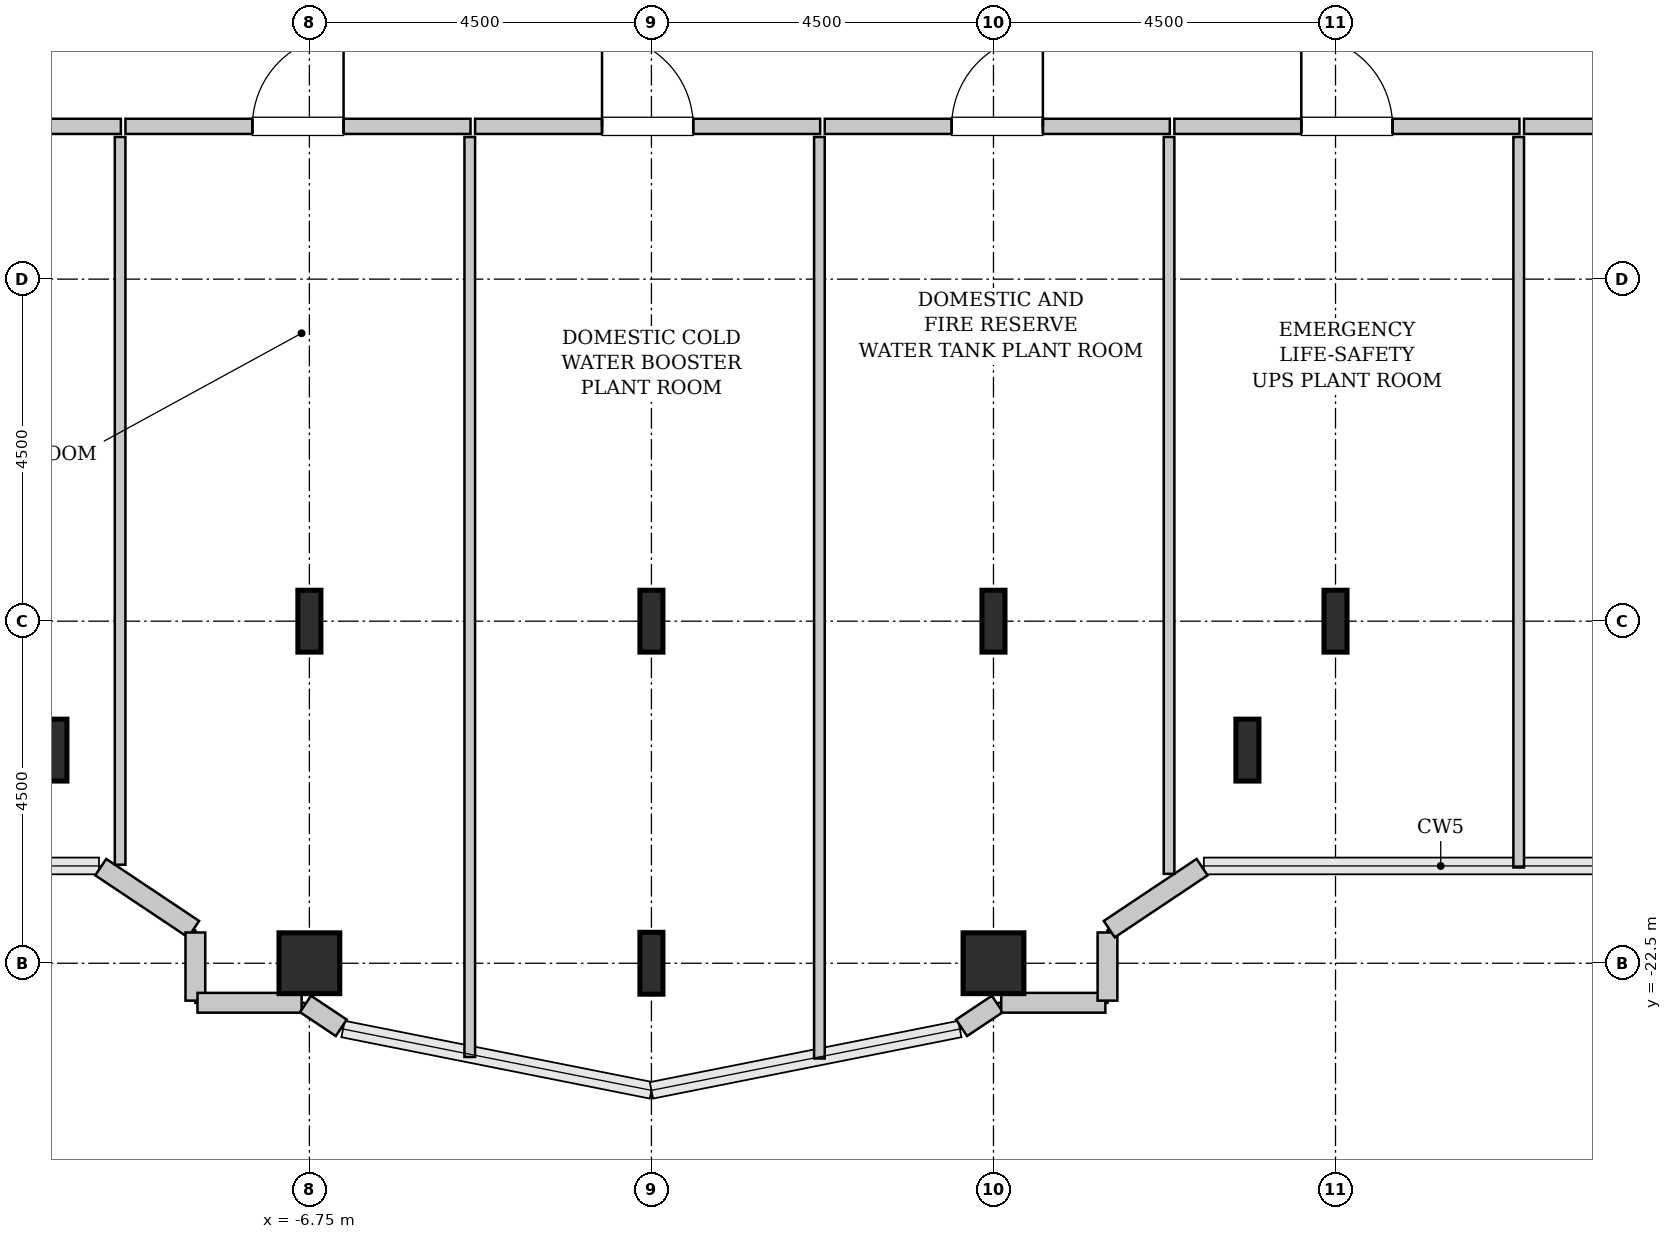
"""IFC4 building model, lengths in metres.
Left out: names, types, materials, properties, quantities, classifications, styles, units other than length and angle.
Written with IfcOpenShell. Run it as: python <this file> out.ifc"""

import sys

from ifc_helpers import new_model, si_unit, direction, frame, frame_2d, origin, origin_2d, place, context, subcontext, project, spatial, rectangle, hollow_rectangle, i_section, extrude, source, transform, mapped, element, fill, save


model = new_model("IFC4")
c1 = context("Model", 3, precision=1e-05, world=origin(), true_north=direction((0.0, 1.0)))
c2 = subcontext(c1, "Body", "Model", "MODEL_VIEW")
j1 = project(units=[si_unit("LENGTHUNIT", "METRE"), si_unit("PLANEANGLEUNIT", "RADIAN")], contexts=[c1])
p1 = place(None, origin())
s1 = spatial("IfcSite", under=j1, at=p1, CompositionType="ELEMENT")
p2 = place(p1, origin())
s2 = spatial("IfcBuilding", under=s1, at=p2, CompositionType="ELEMENT")
p3 = place(p2, frame((0.0, 0.0, 202.0)))
s3 = spatial("IfcBuildingStorey", under=s2, at=p3, CompositionType="ELEMENT", Elevation=202.0)
m1 = source(origin(), c2, "Body", "SweptSolid", [
    extrude(i_section(OverallWidth=0.303, OverallDepth=0.814, WebThickness=0.021, FlangeThickness=0.04, FilletRadius=0.03, at=origin_2d()), origin(), (0.0, 0.0, 1.0), 4.6),
])
p4 = place(p3, frame((-10.091, -19.696, 0.0), z_axis=(0.0, 0.0, 1.0), x_axis=(1.0, 0.0, 0.0)))
e1 = element("IfcColumn", 1, at=p4, inside=s3, PredefinedType="COLUMN", context=c2, shape_type="MappedRepresentation", body=[
    mapped(m1, transform((0.0, 0.0, 0.0), x_axis=(1.0, 0.0, 0.0), y_axis=(0.0, 1.0, 0.0), z_axis=(0.0, 0.0, 1.0), scale=1.0)),
])
m2 = source(origin(), c2, "Body", "SweptSolid", [
    extrude(hollow_rectangle(XDim=0.8, YDim=0.8, WallThickness=0.04, InnerFilletRadius=0.04, OuterFilletRadius=0.08, at=origin_2d()), origin(), (0.0, 0.0, 1.0), 4.6),
])
p5 = place(p3, frame((-6.75, -22.5, 0.0), z_axis=(0.0, 0.0, 1.0), x_axis=(1.0, 0.0, 0.0)))
e2 = element("IfcColumn", 2, at=p5, inside=s3, PredefinedType="COLUMN", context=c2, shape_type="MappedRepresentation", body=[
    mapped(m2, transform((0.0, 0.0, 0.0), x_axis=(1.0, 0.0, 0.0), y_axis=(0.0, 1.0, 0.0), z_axis=(0.0, 0.0, 1.0), scale=1.0)),
])
for number, where, z_axis, x_axis in (
    (3, (-6.75, -18.0, 0.0), (0.0, 0.0, 1.0), (1.0, 0.0, 0.0)),
    (4, (-2.25, -22.5, 0.0), (0.0, 0.0, 1.0), (1.0, 0.0, 0.0)),
    (5, (-2.25, -18.0, 0.0), (0.0, 0.0, 1.0), (1.0, 0.0, 0.0)),
):
    element("IfcColumn", number, at=place(p3, frame(where, z_axis=z_axis, x_axis=x_axis)), inside=s3, PredefinedType="COLUMN", context=c2, shape_type="MappedRepresentation", body=[
        mapped(m1, transform((0.0, 0.0, 0.0), x_axis=(1.0, 0.0, 0.0), y_axis=(0.0, 1.0, 0.0), z_axis=(0.0, 0.0, 1.0), scale=1.0)),
    ])
p6 = place(p3, frame((2.25, -22.5, 0.0), z_axis=(0.0, 0.0, 1.0), x_axis=(1.0, 0.0, 0.0)))
e6 = element("IfcColumn", 6, at=p6, inside=s3, PredefinedType="COLUMN", context=c2, shape_type="MappedRepresentation", body=[
    mapped(m2, transform((0.0, 0.0, 0.0), x_axis=(1.0, 0.0, 0.0), y_axis=(0.0, 1.0, 0.0), z_axis=(0.0, 0.0, 1.0), scale=1.0)),
])
for number, where, z_axis, x_axis in (
    (7, (2.25, -18.0, 0.0), (0.0, 0.0, 1.0), (1.0, 0.0, 0.0)),
    (8, (5.591, -19.696, 0.0), (0.0, 0.0, 1.0), (1.0, 0.0, 0.0)),
    (9, (6.75, -18.0, 0.0), (0.0, 0.0, 1.0), (1.0, 0.0, 0.0)),
):
    element("IfcColumn", number, at=place(p3, frame(where, z_axis=z_axis, x_axis=x_axis)), inside=s3, PredefinedType="COLUMN", context=c2, shape_type="MappedRepresentation", body=[
        mapped(m1, transform((0.0, 0.0, 0.0), x_axis=(1.0, 0.0, 0.0), y_axis=(0.0, 1.0, 0.0), z_axis=(0.0, 0.0, 1.0), scale=1.0)),
    ])
m3 = source(origin(), c2, "Body", "SweptSolid", [
    extrude(rectangle(XDim=1.469, YDim=0.26, at=frame_2d((0.734, 0.0))), origin(), (0.0, 0.0, 1.0), 4.35),
])
p7 = place(p3, frame((-9.495, -21.236, 0.0), z_axis=(0.0, 0.0, 1.0), x_axis=(0.831461760506, -0.555581983884, 0.0)))
e10 = element("IfcWall", 10, at=p7, inside=s3, PredefinedType="SOLIDWALL", context=c2, shape_type="MappedRepresentation", body=[
    mapped(m3, transform((0.0, 0.0, 0.0), x_axis=(1.0, 0.0, 0.0), y_axis=(0.0, 1.0, 0.0), z_axis=(0.0, 0.0, 1.0), scale=1.0)),
])
m4 = source(origin(), c2, "Body", "SweptSolid", [
    extrude(rectangle(XDim=0.897, YDim=0.26, at=frame_2d((0.448, 0.0))), origin(), (0.0, 0.0, 1.0), 4.35),
])
p8 = place(p3, frame((-8.25, -22.095, 0.0), z_axis=(0.0, 0.0, 1.0), x_axis=(0.0, -1.0, 0.0)))
e11 = element("IfcWall", 11, at=p8, inside=s3, PredefinedType="SOLIDWALL", context=c2, shape_type="MappedRepresentation", body=[
    mapped(m4, transform((0.0, 0.0, 0.0), x_axis=(1.0, 0.0, 0.0), y_axis=(0.0, 1.0, 0.0), z_axis=(0.0, 0.0, 1.0), scale=1.0)),
])
m5 = source(origin(), c2, "Body", "SweptSolid", [
    extrude(rectangle(XDim=1.37, YDim=0.26, at=frame_2d((0.685, 0.0))), origin(), (0.0, 0.0, 1.0), 4.35),
])
p9 = place(p3, frame((-8.222, -23.02, 0.0), z_axis=(0.0, 0.0, 1.0), x_axis=(1.0, 0.0, 0.0)))
e12 = element("IfcWall", 12, at=p9, inside=s3, PredefinedType="SOLIDWALL", context=c2, shape_type="MappedRepresentation", body=[
    mapped(m5, transform((0.0, 0.0, 0.0), x_axis=(1.0, 0.0, 0.0), y_axis=(0.0, 1.0, 0.0), z_axis=(0.0, 0.0, 1.0), scale=1.0)),
])
m6 = source(origin(), c2, "Body", "SweptSolid", [
    extrude(rectangle(XDim=0.565, YDim=0.26, at=frame_2d((0.283, 0.0))), origin(), (0.0, 0.0, 1.0), 4.35),
])
for number, where, z_axis, x_axis in (
    (13, (-6.801, -23.036, 0.0), (0.0, 0.0, 1.0), (0.832, -0.555, 0.0)),
    (14, (1.831, -23.35, 0.0), (0.0, 0.0, 1.0), (0.832, 0.555, 0.0)),
):
    element("IfcWall", number, at=place(p3, frame(where, z_axis=z_axis, x_axis=x_axis)), inside=s3, PredefinedType="SOLIDWALL", context=c2, shape_type="MappedRepresentation", body=[
        mapped(m6, transform((0.0, 0.0, 0.0), x_axis=(1.0, 0.0, 0.0), y_axis=(0.0, 1.0, 0.0), z_axis=(0.0, 0.0, 1.0), scale=1.0)),
    ])
p10 = place(p3, frame((2.352, -23.02, 0.0), z_axis=(0.0, 0.0, 1.0), x_axis=(1.0, 0.0, 0.0)))
e15 = element("IfcWall", 15, at=p10, inside=s3, PredefinedType="SOLIDWALL", context=c2, shape_type="MappedRepresentation", body=[
    mapped(m5, transform((0.0, 0.0, 0.0), x_axis=(1.0, 0.0, 0.0), y_axis=(0.0, 1.0, 0.0), z_axis=(0.0, 0.0, 1.0), scale=1.0)),
])
p11 = place(p3, frame((3.75, -22.992, 0.0), z_axis=(0.0, 0.0, 1.0), x_axis=(0.0, 1.0, 0.0)))
e16 = element("IfcWall", 16, at=p11, inside=s3, PredefinedType="SOLIDWALL", context=c2, shape_type="MappedRepresentation", body=[
    mapped(m4, transform((0.0, 0.0, 0.0), x_axis=(1.0, 0.0, 0.0), y_axis=(0.0, 1.0, 0.0), z_axis=(0.0, 0.0, 1.0), scale=1.0)),
])
p12 = place(p3, frame((3.773, -22.052, 0.0), z_axis=(0.0, 0.0, 1.0), x_axis=(0.831461760506, 0.555581983884, 0.0)))
e17 = element("IfcWall", 17, at=p12, inside=s3, PredefinedType="SOLIDWALL", context=c2, shape_type="MappedRepresentation", body=[
    mapped(m3, transform((0.0, 0.0, 0.0), x_axis=(1.0, 0.0, 0.0), y_axis=(0.0, 1.0, 0.0), z_axis=(0.0, 0.0, 1.0), scale=1.0)),
])
m7 = source(origin(), c2, "Body", "SweptSolid", [
    extrude(rectangle(XDim=24.85, YDim=0.2, at=frame_2d((12.425, 0.0))), origin(), (0.0, 0.0, 1.0), 4.335),
])
p13 = place(p3, frame((-34.08, -11.49, 0.0), z_axis=(0.0, 0.0, 1.0), x_axis=(1.0, 0.0, 0.0)))
e18 = element("IfcWall", 18, at=p13, inside=s3, PredefinedType="SOLIDWALL", context=c2, shape_type="MappedRepresentation", body=[
    mapped(m7, transform((0.0, 0.0, 0.0), x_axis=(1.0, 0.0, 0.0), y_axis=(0.0, 1.0, 0.0), z_axis=(0.0, 0.0, 1.0), scale=1.0)),
])
p14 = place(p13, frame((21.786, 0.0, 0.0)))
e19 = element("IfcOpeningElement", 19, at=p14, cuts=e18, PredefinedType="OPENING", context=c2, shape_type="SweptSolid", body=[
    extrude(rectangle(XDim=1.2, YDim=2.15, at=frame_2d((0.6, 1.075))), frame((0.0, 0.11, 0.0), z_axis=(0.0, -1.0, 0.0), x_axis=(1.0, 0.0, 0.0)), (0.0, 0.0, 1.0), 0.22),
])
m8 = source(origin(), c2, "Body", "SweptSolid", [
    extrude(rectangle(XDim=9.574, YDim=0.14, at=frame_2d((4.787, 0.0))), origin(), (0.0, 0.0, 1.0), 4.335),
])
p15 = place(p3, frame((-9.24, -21.204, 0.0), z_axis=(0.0, 0.0, 1.0), x_axis=(0.0, 1.0, 0.0)))
e20 = element("IfcWall", 20, at=p15, inside=s3, PredefinedType="PARTITIONING", context=c2, shape_type="MappedRepresentation", body=[
    mapped(m8, transform((0.0, 0.0, 0.0), x_axis=(1.0, 0.0, 0.0), y_axis=(0.0, 1.0, 0.0), z_axis=(0.0, 0.0, 1.0), scale=1.0)),
])
m9 = source(origin(), c2, "Body", "SweptSolid", [
    extrude(rectangle(XDim=4.54, YDim=0.2, at=frame_2d((2.27, 0.0))), origin(), (0.0, 0.0, 1.0), 4.335),
])
p16 = place(p3, frame((-9.17, -11.49, 0.0), z_axis=(0.0, 0.0, 1.0), x_axis=(1.0, 0.0, 0.0)))
e21 = element("IfcWall", 21, at=p16, inside=s3, PredefinedType="SOLIDWALL", context=c2, shape_type="MappedRepresentation", body=[
    mapped(m9, transform((0.0, 0.0, 0.0), x_axis=(1.0, 0.0, 0.0), y_axis=(0.0, 1.0, 0.0), z_axis=(0.0, 0.0, 1.0), scale=1.0)),
])
p17 = place(p16, frame((1.67, 0.0, 0.0)))
e22 = element("IfcOpeningElement", 22, at=p17, cuts=e21, PredefinedType="OPENING", context=c2, shape_type="SweptSolid", body=[
    extrude(rectangle(XDim=1.2, YDim=2.15, at=frame_2d((0.6, 1.075))), frame((0.0, 0.11, 0.0), z_axis=(0.0, -1.0, 0.0), x_axis=(1.0, 0.0, 0.0)), (0.0, 0.0, 1.0), 0.22),
])
m10 = source(origin(), c2, "Body", "SweptSolid", [
    extrude(rectangle(XDim=12.104, YDim=0.14, at=frame_2d((6.052, 0.0))), origin(), (0.0, 0.0, 1.0), 4.335),
])
p18 = place(p3, frame((-4.64, -23.733, 0.0), z_axis=(0.0, 0.0, 1.0), x_axis=(0.0, 1.0, 0.0)))
e23 = element("IfcWall", 23, at=p18, inside=s3, PredefinedType="PARTITIONING", context=c2, shape_type="MappedRepresentation", body=[
    mapped(m10, transform((0.0, 0.0, 0.0), x_axis=(1.0, 0.0, 0.0), y_axis=(0.0, 1.0, 0.0), z_axis=(0.0, 0.0, 1.0), scale=1.0)),
])
p19 = place(p3, frame((-4.57, -11.49, 0.0), z_axis=(0.0, 0.0, 1.0), x_axis=(1.0, 0.0, 0.0)))
e24 = element("IfcWall", 24, at=p19, inside=s3, PredefinedType="SOLIDWALL", context=c2, shape_type="MappedRepresentation", body=[
    mapped(m9, transform((0.0, 0.0, 0.0), x_axis=(1.0, 0.0, 0.0), y_axis=(0.0, 1.0, 0.0), z_axis=(0.0, 0.0, 1.0), scale=1.0)),
])
p20 = place(p19, frame((1.67, 0.0, 0.0)))
e25 = element("IfcOpeningElement", 25, at=p20, cuts=e24, PredefinedType="OPENING", context=c2, shape_type="SweptSolid", body=[
    extrude(rectangle(XDim=1.2, YDim=2.15, at=frame_2d((0.6, 1.075))), frame((0.0, 0.11, 0.0), z_axis=(0.0, -1.0, 0.0), x_axis=(1.0, 0.0, 0.0)), (0.0, 0.0, 1.0), 0.22),
])
m11 = source(origin(), c2, "Body", "SweptSolid", [
    extrude(rectangle(XDim=12.123, YDim=0.14, at=frame_2d((6.062, 0.0))), origin(), (0.0, 0.0, 1.0), 4.335),
])
p21 = place(p3, frame((-0.04, -23.753, 0.0), z_axis=(0.0, 0.0, 1.0), x_axis=(0.0, 1.0, 0.0)))
e26 = element("IfcWall", 26, at=p21, inside=s3, PredefinedType="PARTITIONING", context=c2, shape_type="MappedRepresentation", body=[
    mapped(m11, transform((0.0, 0.0, 0.0), x_axis=(1.0, 0.0, 0.0), y_axis=(0.0, 1.0, 0.0), z_axis=(0.0, 0.0, 1.0), scale=1.0)),
])
p22 = place(p3, frame((0.03, -11.49, 0.0), z_axis=(0.0, 0.0, 1.0), x_axis=(1.0, 0.0, 0.0)))
e27 = element("IfcWall", 27, at=p22, inside=s3, PredefinedType="SOLIDWALL", context=c2, shape_type="MappedRepresentation", body=[
    mapped(m9, transform((0.0, 0.0, 0.0), x_axis=(1.0, 0.0, 0.0), y_axis=(0.0, 1.0, 0.0), z_axis=(0.0, 0.0, 1.0), scale=1.0)),
])
p23 = place(p22, frame((1.67, 0.0, 0.0)))
e28 = element("IfcOpeningElement", 28, at=p23, cuts=e27, PredefinedType="OPENING", context=c2, shape_type="SweptSolid", body=[
    extrude(rectangle(XDim=1.2, YDim=2.15, at=frame_2d((0.6, 1.075))), frame((0.0, 0.11, 0.0), z_axis=(0.0, -1.0, 0.0), x_axis=(1.0, 0.0, 0.0)), (0.0, 0.0, 1.0), 0.22),
])
m12 = source(origin(), c2, "Body", "SweptSolid", [
    extrude(rectangle(XDim=9.694, YDim=0.14, at=frame_2d((4.847, 0.0))), origin(), (0.0, 0.0, 1.0), 4.335),
])
p24 = place(p3, frame((4.56, -21.324, 0.0), z_axis=(0.0, 0.0, 1.0), x_axis=(0.0, 1.0, 0.0)))
e29 = element("IfcWall", 29, at=p24, inside=s3, PredefinedType="PARTITIONING", context=c2, shape_type="MappedRepresentation", body=[
    mapped(m12, transform((0.0, 0.0, 0.0), x_axis=(1.0, 0.0, 0.0), y_axis=(0.0, 1.0, 0.0), z_axis=(0.0, 0.0, 1.0), scale=1.0)),
])
p25 = place(p3, frame((4.63, -11.49, 0.0), z_axis=(0.0, 0.0, 1.0), x_axis=(1.0, 0.0, 0.0)))
e30 = element("IfcWall", 30, at=p25, inside=s3, PredefinedType="SOLIDWALL", context=c2, shape_type="MappedRepresentation", body=[
    mapped(m9, transform((0.0, 0.0, 0.0), x_axis=(1.0, 0.0, 0.0), y_axis=(0.0, 1.0, 0.0), z_axis=(0.0, 0.0, 1.0), scale=1.0)),
])
p26 = place(p25, frame((1.67, 0.0, 0.0)))
e31 = element("IfcOpeningElement", 31, at=p26, cuts=e30, PredefinedType="OPENING", context=c2, shape_type="SweptSolid", body=[
    extrude(rectangle(XDim=1.2, YDim=2.15, at=frame_2d((0.6, 1.075))), frame((0.0, 0.11, 0.0), z_axis=(0.0, -1.0, 0.0), x_axis=(1.0, 0.0, 0.0)), (0.0, 0.0, 1.0), 0.22),
])
m13 = source(origin(), c2, "Body", "SweptSolid", [
    extrude(rectangle(XDim=9.61, YDim=0.14, at=frame_2d((4.805, 0.0))), origin(), (0.0, 0.0, 1.0), 4.335),
])
p27 = place(p3, frame((9.16, -21.24, 0.0), z_axis=(0.0, 0.0, 1.0), x_axis=(0.0, 1.0, 0.0)))
e32 = element("IfcWall", 32, at=p27, inside=s3, PredefinedType="PARTITIONING", context=c2, shape_type="MappedRepresentation", body=[
    mapped(m13, transform((0.0, 0.0, 0.0), x_axis=(1.0, 0.0, 0.0), y_axis=(0.0, 1.0, 0.0), z_axis=(0.0, 0.0, 1.0), scale=1.0)),
])
m14 = source(origin(), c2, "Body", "SweptSolid", [
    extrude(rectangle(XDim=15.85, YDim=0.2, at=frame_2d((7.925, 0.0))), origin(), (0.0, 0.0, 1.0), 4.335),
])
p28 = place(p3, frame((9.23, -11.49, 0.0), z_axis=(0.0, 0.0, 1.0), x_axis=(1.0, 0.0, 0.0)))
e33 = element("IfcWall", 33, at=p28, inside=s3, PredefinedType="SOLIDWALL", context=c2, shape_type="MappedRepresentation", body=[
    mapped(m14, transform((0.0, 0.0, 0.0), x_axis=(1.0, 0.0, 0.0), y_axis=(0.0, 1.0, 0.0), z_axis=(0.0, 0.0, 1.0), scale=1.0)),
])
p29 = place(p28, frame((1.864, 0.0, 0.0)))
e34 = element("IfcOpeningElement", 34, at=p29, cuts=e33, PredefinedType="OPENING", context=c2, shape_type="SweptSolid", body=[
    extrude(rectangle(XDim=1.2, YDim=2.15, at=frame_2d((0.6, 1.075))), frame((0.0, 0.11, 0.0), z_axis=(0.0, -1.0, 0.0), x_axis=(1.0, 0.0, 0.0)), (0.0, 0.0, 1.0), 0.22),
])
m15 = source(origin(), c2, "Body", "SweptSolid", [
    extrude(rectangle(XDim=1.2, YDim=2.15, at=frame_2d((0.6, 1.075))), frame((0.0, 0.025, 0.0), z_axis=(0.0, -1.0, 0.0), x_axis=(1.0, 0.0, 0.0)), (0.0, 0.0, 1.0), 0.05),
])
p30 = place(p17, origin())
e35 = element("IfcDoor", 35, at=p30, inside=s3, OperationType="SINGLE_SWING_RIGHT", PredefinedType="DOOR", context=c2, shape_type="MappedRepresentation", body=[
    mapped(m15, transform((0.0, 0.0, 0.0), x_axis=(1.0, 0.0, 0.0), y_axis=(0.0, 1.0, 0.0), z_axis=(0.0, 0.0, 1.0), scale=1.0)),
])
fill(e22, e35)
p31 = place(p20, origin())
e36 = element("IfcDoor", 36, at=p31, inside=s3, OperationType="SINGLE_SWING_LEFT", PredefinedType="DOOR", context=c2, shape_type="MappedRepresentation", body=[
    mapped(m15, transform((0.0, 0.0, 0.0), x_axis=(1.0, 0.0, 0.0), y_axis=(0.0, 1.0, 0.0), z_axis=(0.0, 0.0, 1.0), scale=1.0)),
])
fill(e25, e36)
p32 = place(p23, origin())
e37 = element("IfcDoor", 37, at=p32, inside=s3, OperationType="SINGLE_SWING_RIGHT", PredefinedType="DOOR", context=c2, shape_type="MappedRepresentation", body=[
    mapped(m15, transform((0.0, 0.0, 0.0), x_axis=(1.0, 0.0, 0.0), y_axis=(0.0, 1.0, 0.0), z_axis=(0.0, 0.0, 1.0), scale=1.0)),
])
fill(e28, e37)
p33 = place(p26, origin())
e38 = element("IfcDoor", 38, at=p33, inside=s3, OperationType="SINGLE_SWING_LEFT", PredefinedType="DOOR", context=c2, shape_type="MappedRepresentation", body=[
    mapped(m15, transform((0.0, 0.0, 0.0), x_axis=(1.0, 0.0, 0.0), y_axis=(0.0, 1.0, 0.0), z_axis=(0.0, 0.0, 1.0), scale=1.0)),
])
fill(e31, e38)
save(model, sys.argv[1])
